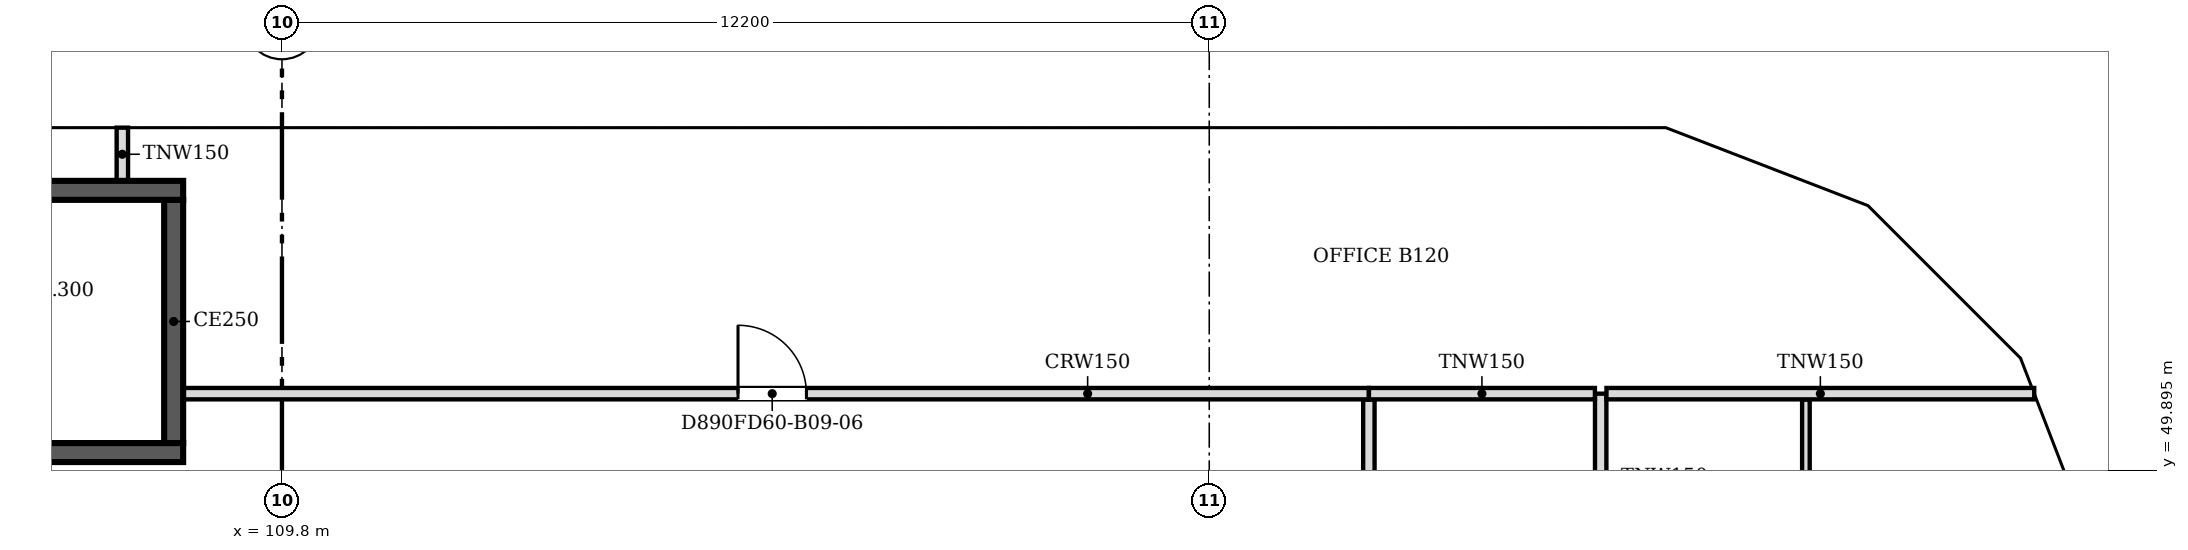
"""IFC4 building model, lengths in metres.
Left out: names, types, materials, properties, quantities, classifications, styles, units other than length and angle.
Written with IfcOpenShell. Run it as: python <this file> out.ifc"""

import sys

from ifc_helpers import new_model, si_unit, direction, frame, frame_2d, origin, place, context, subcontext, project, spatial, polyline, rectangle, outline, extrude, faceted_brep, source, transform, mapped, element, fill, save


model = new_model("IFC4")
c1 = context("Model", 3, precision=1e-05, world=origin(), true_north=direction((0.0, 1.0)))
c2 = subcontext(c1, "Body", "Model", "MODEL_VIEW")
j1 = project(units=[si_unit("LENGTHUNIT", "METRE"), si_unit("PLANEANGLEUNIT", "RADIAN")], contexts=[c1])
p1 = place(None, origin())
s1 = spatial("IfcSite", under=j1, at=p1, CompositionType="ELEMENT")
p2 = place(p1, origin())
s2 = spatial("IfcBuilding", under=s1, at=p2, CompositionType="ELEMENT")
p3 = place(p2, frame((0.0, 0.0, 91.4)))
s3 = spatial("IfcBuildingStorey", under=s2, at=p3, CompositionType="ELEMENT", Elevation=91.4)
m1 = source(origin(), c2, "Body", "Brep", [
    faceted_brep([(2.95, -0.25, 0.0), (3.003, -0.25, 0.068), (3.003, -0.25, 7.531), (2.95, -0.25, 7.6), (0.0, -0.25, 3.8), (0.047, 0.25, 3.86), (2.898, 0.25, 7.532), (2.898, 0.25, 0.068), (0.047, 0.25, 3.74), (2.95, 0.0, 0.0), (2.95, 0.0, 7.6), (0.0, 0.0, 3.8)], [[[0, 1, 2, 3, 4]], [[5, 6, 7, 8]], [[1, 0, 9]], [[10, 3, 2]], [[6, 5, 11, 4, 3, 10]], [[8, 7, 9, 0, 4, 11]], [[8, 11, 5]], [[1, 9, 7, 6, 10, 2]]]),
])
p4 = place(p3, frame((133.95, 48.753, -3.8), z_axis=(0.0, 0.0, 1.0), x_axis=(-0.359855894603, 0.933007896601, 0.0)))
e1 = element("IfcWall", 1, at=p4, inside=s3, PredefinedType="SOLIDWALL", context=c2, shape_type="MappedRepresentation", body=[
    mapped(m1, transform((0.0, 0.0, 0.0), scale=1.0)),
])
m2 = source(origin(), c2, "Body", "SweptSolid", [
    extrude(outline(polyline([(2.75, 6.935), (0.316, 3.8), (2.75, 0.665), (2.75, 6.935)])), frame((0.0, 0.26, 0.0), z_axis=(0.0, -1.0, 0.0), x_axis=(1.0, 0.0, 0.0)), (0.0, 0.0, 1.0), 0.52),
])
p5 = place(p4, origin())
e2 = element("IfcOpeningElement", 2, at=p5, cuts=e1, PredefinedType="OPENING", context=c2, shape_type="MappedRepresentation", body=[
    mapped(m2, transform((0.0, 0.0, 0.0), scale=1.0)),
])
m3 = source(origin(), c2, "Body", "Brep", [
    faceted_brep([(0.053, -0.25, 0.0), (2.997, -0.25, 3.8), (0.053, -0.25, 7.6), (0.0, -0.25, 7.532), (0.0, -0.25, 0.068), (0.106, 0.25, 7.531), (2.944, 0.25, 3.868), (2.944, 0.25, 3.732), (0.106, 0.25, 0.068), (2.997, 0.0, 3.8), (0.053, 0.0, 0.0), (0.053, 0.0, 7.6)], [[[0, 1, 2, 3, 4]], [[5, 6, 7, 8]], [[8, 7, 9, 1, 0, 10]], [[6, 5, 11, 2, 1, 9]], [[3, 2, 11]], [[10, 0, 4]], [[8, 10, 4, 3, 11, 5]], [[9, 7, 6]]]),
])
p6 = place(p3, frame((132.926, 51.469, -3.8), z_axis=(0.0, 0.0, 1.0), x_axis=(-0.707066050402, 0.707147509625, 0.0)))
e3 = element("IfcWall", 3, at=p6, inside=s3, PredefinedType="SOLIDWALL", context=c2, shape_type="MappedRepresentation", body=[
    mapped(m3, transform((0.0, 0.0, 0.0), scale=1.0)),
])
m4 = source(origin(), c2, "Body", "SweptSolid", [
    extrude(outline(polyline([(0.253, 0.666), (2.681, 3.8), (0.253, 6.934), (0.253, 0.666)])), frame((0.0, 0.26, 0.0), z_axis=(0.0, -1.0, 0.0), x_axis=(1.0, 0.0, 0.0)), (0.0, 0.0, 1.0), 0.52),
])
p7 = place(p6, origin())
e4 = element("IfcOpeningElement", 4, at=p7, cuts=e3, PredefinedType="OPENING", context=c2, shape_type="MappedRepresentation", body=[
    mapped(m4, transform((0.0, 0.0, 0.0), scale=1.0)),
])
m5 = source(origin(), c2, "Body", "Brep", [
    faceted_brep([(2.95, -0.25, 0.0), (2.997, -0.25, 0.059), (2.997, -0.25, 7.541), (2.95, -0.25, 7.6), (0.0, -0.25, 3.8), (0.053, 0.25, 3.868), (2.904, 0.25, 7.54), (2.904, 0.25, 0.06), (0.053, 0.25, 3.732), (2.95, 0.0, 0.0), (2.95, 0.0, 7.6), (0.0, 0.0, 3.8)], [[[0, 1, 2, 3, 4]], [[5, 6, 7, 8]], [[1, 0, 9]], [[10, 3, 2]], [[6, 5, 11, 4, 3, 10]], [[8, 7, 9, 0, 4, 11]], [[8, 11, 5]], [[1, 9, 7, 6, 10, 2]]]),
])
p8 = place(p3, frame((130.806, 53.588, -3.8), z_axis=(0.0, 0.0, 1.0), x_axis=(-0.932990326376, 0.359901446078, 0.0)))
e5 = element("IfcWall", 5, at=p8, inside=s3, PredefinedType="SOLIDWALL", context=c2, shape_type="MappedRepresentation", body=[
    mapped(m5, transform((0.0, 0.0, 0.0), scale=1.0)),
])
p9 = place(p8, origin())
e6 = element("IfcOpeningElement", 6, at=p9, cuts=e5, PredefinedType="OPENING", context=c2, shape_type="MappedRepresentation", body=[
    mapped(m2, transform((0.0, 0.0, 0.0), scale=1.0)),
])
m6 = source(origin(), c2, "Body", "Brep", [
    faceted_brep([(0.047, -0.25, 0.0), (3.05, -0.25, 3.8), (0.047, -0.25, 7.6), (0.0, -0.25, 7.54), (0.0, -0.25, 0.06), (0.093, 0.25, 7.541), (3.05, 0.25, 3.8), (0.093, 0.25, 0.059), (0.047, 0.0, 0.0), (0.047, 0.0, 7.6)], [[[0, 1, 2, 3, 4]], [[5, 6, 7]], [[7, 6, 1, 0, 8]], [[6, 5, 9, 2, 1]], [[3, 2, 9]], [[8, 0, 4]], [[7, 8, 4, 3, 9, 5]]]),
])
p10 = place(p3, frame((128.1, 54.65, -3.8), z_axis=(0.0, 0.0, 1.0), x_axis=(-1.0, 0.0, 0.0)))
e7 = element("IfcWall", 7, at=p10, inside=s3, PredefinedType="SOLIDWALL", context=c2, shape_type="MappedRepresentation", body=[
    mapped(m6, transform((0.0, 0.0, 0.0), scale=1.0)),
])
m7 = source(origin(), c2, "Body", "SweptSolid", [
    extrude(outline(polyline([(0.247, 0.656), (2.731, 3.8), (0.247, 6.944), (0.247, 0.656)])), frame((0.0, 0.26, 0.0), z_axis=(0.0, -1.0, 0.0), x_axis=(1.0, 0.0, 0.0)), (0.0, 0.0, 1.0), 0.52),
])
p11 = place(p10, origin())
e8 = element("IfcOpeningElement", 8, at=p11, cuts=e7, PredefinedType="OPENING", context=c2, shape_type="MappedRepresentation", body=[
    mapped(m7, transform((0.0, 0.0, 0.0), scale=1.0)),
])
m8 = source(origin(), c2, "Body", "SweptSolid", [
    extrude(outline(polyline([(3.05, 0.0), (6.1, 3.8), (3.05, 7.6), (0.0, 3.8), (3.05, 0.0)])), frame((0.0, 0.25, 0.0), z_axis=(0.0, -1.0, 0.0), x_axis=(1.0, 0.0, 0.0)), (0.0, 0.0, 1.0), 0.5),
])
p12 = place(p3, frame((125.05, 54.65, -3.8), z_axis=(0.0, 0.0, 1.0), x_axis=(-1.0, 0.0, 0.0)))
e9 = element("IfcWall", 9, at=p12, inside=s3, PredefinedType="SOLIDWALL", context=c2, shape_type="MappedRepresentation", body=[
    mapped(m8, transform((0.0, 0.0, 0.0), scale=1.0)),
])
m9 = source(origin(), c2, "Body", "SweptSolid", [
    extrude(outline(polyline([(3.05, 0.399), (5.78, 3.8), (3.05, 7.2), (0.321, 3.8), (3.05, 0.399)])), frame((0.0, 0.26, 0.0), z_axis=(0.0, -1.0, 0.0), x_axis=(1.0, 0.0, 0.0)), (0.0, 0.0, 1.0), 0.52),
])
p13 = place(p12, origin())
e10 = element("IfcOpeningElement", 10, at=p13, cuts=e9, PredefinedType="OPENING", context=c2, shape_type="MappedRepresentation", body=[
    mapped(m9, transform((0.0, 0.0, 0.0), scale=1.0)),
])
m10 = source(origin(), c2, "Body", "Brep", [
    faceted_brep([(3.05, -0.25, 0.0), (6.1, -0.25, 3.8), (6.1, -0.25, 3.8), (3.05, -0.25, 7.6), (0.0, -0.25, 3.8), (0.0, 0.25, 3.8), (3.05, 0.25, 7.6), (6.1, 0.25, 3.8), (6.1, 0.25, 3.8), (3.05, 0.25, 0.0)], [[[0, 1, 2, 3, 4]], [[5, 6, 7, 8, 9]], [[9, 8, 1, 0]], [[7, 6, 3, 2]], [[6, 5, 4, 3]], [[5, 9, 0, 4]], [[1, 8, 7, 2]]]),
])
p14 = place(p3, frame((118.95, 54.65, -3.8), z_axis=(0.0, 0.0, 1.0), x_axis=(-1.0, 0.0, 0.0)))
e11 = element("IfcWall", 11, at=p14, inside=s3, PredefinedType="SOLIDWALL", context=c2, shape_type="MappedRepresentation", body=[
    mapped(m10, transform((0.0, 0.0, 0.0), scale=1.0)),
])
p15 = place(p14, origin())
e12 = element("IfcOpeningElement", 12, at=p15, cuts=e11, PredefinedType="OPENING", context=c2, shape_type="MappedRepresentation", body=[
    mapped(m9, transform((0.0, 0.0, 0.0), scale=1.0)),
])
p16 = place(p3, frame((112.85, 54.65, -3.8), z_axis=(0.0, 0.0, 1.0), x_axis=(-1.0, 0.0, 0.0)))
e13 = element("IfcWall", 13, at=p16, inside=s3, PredefinedType="SOLIDWALL", context=c2, shape_type="MappedRepresentation", body=[
    mapped(m8, transform((0.0, 0.0, 0.0), scale=1.0)),
])
p17 = place(p16, origin())
e14 = element("IfcOpeningElement", 14, at=p17, cuts=e13, PredefinedType="OPENING", context=c2, shape_type="MappedRepresentation", body=[
    mapped(m9, transform((0.0, 0.0, 0.0), scale=1.0)),
])
m11 = source(origin(), c2, "Body", "Brep", [
    faceted_brep([(0.047, -0.25, 0.0), (2.997, -0.25, 3.8), (0.0, -0.25, 3.8), (0.0, -0.25, 0.059), (0.093, 0.25, 3.8), (2.944, 0.25, 3.8), (2.944, 0.25, 3.732), (0.093, 0.25, 0.06), (2.997, 0.0, 3.8), (0.047, 0.0, 0.0)], [[[0, 1, 2, 3]], [[4, 5, 6, 7]], [[7, 6, 8, 1, 0, 9]], [[5, 4, 2, 1, 8]], [[9, 0, 3]], [[7, 9, 3, 2, 4]], [[6, 5, 8]]]),
])
p18 = place(p3, frame((133.967, 48.71, 0.0), z_axis=(0.0, 0.0, 1.0), x_axis=(-0.359901446078, 0.932990326376, 0.0)))
e15 = element("IfcWall", 15, at=p18, inside=s3, PredefinedType="SOLIDWALL", context=c2, shape_type="MappedRepresentation", body=[
    mapped(m11, transform((0.0, 0.0, 0.0), scale=1.0)),
])
m12 = source(origin(), c2, "Body", "SweptSolid", [
    extrude(outline(polyline([(0.247, 0.665), (2.487, 3.55), (0.247, 3.55), (0.247, 0.665)])), frame((0.0, 0.26, 0.0), z_axis=(0.0, -1.0, 0.0), x_axis=(1.0, 0.0, 0.0)), (0.0, 0.0, 1.0), 0.52),
])
p19 = place(p18, origin())
e16 = element("IfcOpeningElement", 16, at=p19, cuts=e15, PredefinedType="OPENING", context=c2, shape_type="MappedRepresentation", body=[
    mapped(m12, transform((0.0, 0.0, 0.0), scale=1.0)),
])
m13 = source(origin(), c2, "Body", "Brep", [
    faceted_brep([(2.944, -0.25, 0.0), (2.997, -0.25, 0.068), (2.997, -0.25, 3.8), (0.0, -0.25, 3.8), (0.053, 0.25, 3.8), (2.891, 0.25, 3.8), (2.891, 0.25, 0.068), (0.053, 0.25, 3.732), (2.944, 0.0, 0.0), (0.0, 0.0, 3.8)], [[[0, 1, 2, 3]], [[4, 5, 6, 7]], [[1, 0, 8]], [[5, 4, 9, 3, 2]], [[7, 6, 8, 0, 3, 9]], [[7, 9, 4]], [[1, 8, 6, 5, 2]]]),
])
p20 = place(p3, frame((132.888, 51.506, 0.0), z_axis=(0.0, 0.0, 1.0), x_axis=(-0.707147509625, 0.707066050402, 0.0)))
e17 = element("IfcWall", 17, at=p20, inside=s3, PredefinedType="SOLIDWALL", context=c2, shape_type="MappedRepresentation", body=[
    mapped(m13, transform((0.0, 0.0, 0.0), scale=1.0)),
])
m14 = source(origin(), c2, "Body", "SweptSolid", [
    extrude(outline(polyline([(2.744, 3.55), (0.51, 3.55), (2.744, 0.667), (2.744, 3.55)])), frame((0.0, 0.26, 0.0), z_axis=(0.0, -1.0, 0.0), x_axis=(1.0, 0.0, 0.0)), (0.0, 0.0, 1.0), 0.52),
])
p21 = place(p20, origin())
e18 = element("IfcOpeningElement", 18, at=p21, cuts=e17, PredefinedType="OPENING", context=c2, shape_type="MappedRepresentation", body=[
    mapped(m14, transform((0.0, 0.0, 0.0), scale=1.0)),
])
m15 = source(origin(), c2, "Body", "Brep", [
    faceted_brep([(0.053, -0.25, 0.0), (3.003, -0.25, 3.8), (0.0, -0.25, 3.8), (0.0, -0.25, 0.068), (0.106, 0.25, 3.8), (2.957, 0.25, 3.8), (2.957, 0.25, 3.74), (0.106, 0.25, 0.068), (3.003, 0.0, 3.8), (0.053, 0.0, 0.0)], [[[0, 1, 2, 3]], [[4, 5, 6, 7]], [[7, 6, 8, 1, 0, 9]], [[5, 4, 2, 1, 8]], [[9, 0, 3]], [[7, 9, 3, 2, 4]], [[6, 5, 8]]]),
])
p22 = place(p3, frame((130.856, 53.569, 0.0), z_axis=(0.0, 0.0, 1.0), x_axis=(-0.933007896601, 0.359855894603, 0.0)))
e19 = element("IfcWall", 19, at=p22, inside=s3, PredefinedType="SOLIDWALL", context=c2, shape_type="MappedRepresentation", body=[
    mapped(m15, transform((0.0, 0.0, 0.0), scale=1.0)),
])
m16 = source(origin(), c2, "Body", "SweptSolid", [
    extrude(outline(polyline([(0.253, 0.665), (2.493, 3.55), (0.253, 3.55), (0.253, 0.665)])), frame((0.0, 0.26, 0.0), z_axis=(0.0, -1.0, 0.0), x_axis=(1.0, 0.0, 0.0)), (0.0, 0.0, 1.0), 0.52),
])
p23 = place(p22, origin())
e20 = element("IfcOpeningElement", 20, at=p23, cuts=e19, PredefinedType="OPENING", context=c2, shape_type="MappedRepresentation", body=[
    mapped(m16, transform((0.0, 0.0, 0.0), scale=1.0)),
])
m17 = source(origin(), c2, "Body", "Brep", [
    faceted_brep([(3.003, -0.25, 0.0), (6.053, -0.25, 3.8), (0.0, -0.25, 3.8), (0.047, 0.25, 3.8), (6.053, 0.25, 3.8), (3.003, 0.25, 0.0), (0.047, 0.25, 3.741), (0.0, 0.0, 3.8)], [[[0, 1, 2]], [[3, 4, 5, 6]], [[5, 4, 1, 0]], [[4, 3, 7, 2, 1]], [[6, 5, 0, 2, 7]], [[6, 7, 3]]]),
])
p24 = place(p3, frame((128.053, 54.65, 0.0), z_axis=(0.0, 0.0, 1.0), x_axis=(-1.0, 0.0, 0.0)))
e21 = element("IfcWall", 21, at=p24, inside=s3, PredefinedType="SOLIDWALL", context=c2, shape_type="MappedRepresentation", body=[
    mapped(m17, transform((0.0, 0.0, 0.0), scale=1.0)),
])
m18 = source(origin(), c2, "Body", "SweptSolid", [
    extrude(outline(polyline([(3.005, 0.401), (5.532, 3.55), (0.516, 3.55), (3.005, 0.401)])), frame((0.0, 0.26, 0.0), z_axis=(0.0, -1.0, 0.0), x_axis=(1.0, 0.0, 0.0)), (0.0, 0.0, 1.0), 0.52),
])
p25 = place(p24, origin())
e22 = element("IfcOpeningElement", 22, at=p25, cuts=e21, PredefinedType="OPENING", context=c2, shape_type="MappedRepresentation", body=[
    mapped(m18, transform((0.0, 0.0, 0.0), scale=1.0)),
])
m19 = source(origin(), c2, "Body", "SweptSolid", [
    extrude(outline(polyline([(3.05, 0.0), (6.1, 3.8), (0.0, 3.8), (3.05, 0.0)])), frame((0.0, 0.25, 0.0), z_axis=(0.0, -1.0, 0.0), x_axis=(1.0, 0.0, 0.0)), (0.0, 0.0, 1.0), 0.5),
])
p26 = place(p3, frame((122.0, 54.65, 0.0), z_axis=(0.0, 0.0, 1.0), x_axis=(-1.0, 0.0, 0.0)))
e23 = element("IfcWall", 23, at=p26, inside=s3, PredefinedType="SOLIDWALL", context=c2, shape_type="MappedRepresentation", body=[
    mapped(m19, transform((0.0, 0.0, 0.0), scale=1.0)),
])
m20 = source(origin(), c2, "Body", "SweptSolid", [
    extrude(outline(polyline([(3.05, 0.399), (5.579, 3.55), (0.521, 3.55), (3.05, 0.399)])), frame((0.0, 0.26, 0.0), z_axis=(0.0, -1.0, 0.0), x_axis=(1.0, 0.0, 0.0)), (0.0, 0.0, 1.0), 0.52),
])
p27 = place(p26, origin())
e24 = element("IfcOpeningElement", 24, at=p27, cuts=e23, PredefinedType="OPENING", context=c2, shape_type="MappedRepresentation", body=[
    mapped(m20, transform((0.0, 0.0, 0.0), scale=1.0)),
])
m21 = source(origin(), c2, "Body", "Brep", [
    faceted_brep([(3.05, -0.25, 0.0), (6.1, -0.25, 3.8), (6.1, -0.25, 3.8), (0.0, -0.25, 3.8), (0.0, 0.25, 3.8), (6.1, 0.25, 3.8), (6.1, 0.25, 3.8), (3.05, 0.25, 0.0)], [[[0, 1, 2, 3]], [[4, 5, 6, 7]], [[7, 6, 1, 0]], [[5, 4, 3, 2]], [[4, 7, 0, 3]], [[1, 6, 5, 2]]]),
])
p28 = place(p3, frame((115.9, 54.65, 0.0), z_axis=(0.0, 0.0, 1.0), x_axis=(-1.0, 0.0, 0.0)))
e25 = element("IfcWall", 25, at=p28, inside=s3, PredefinedType="SOLIDWALL", context=c2, shape_type="MappedRepresentation", body=[
    mapped(m21, transform((0.0, 0.0, 0.0), scale=1.0)),
])
p29 = place(p28, origin())
e26 = element("IfcOpeningElement", 26, at=p29, cuts=e25, PredefinedType="OPENING", context=c2, shape_type="MappedRepresentation", body=[
    mapped(m20, transform((0.0, 0.0, 0.0), scale=1.0)),
])
p30 = place(p3, frame((109.8, 54.65, 0.0), z_axis=(0.0, 0.0, 1.0), x_axis=(-1.0, 0.0, 0.0)))
e27 = element("IfcWall", 27, at=p30, inside=s3, PredefinedType="SOLIDWALL", context=c2, shape_type="MappedRepresentation", body=[
    mapped(m19, transform((0.0, 0.0, 0.0), scale=1.0)),
])
p31 = place(p30, origin())
e28 = element("IfcOpeningElement", 28, at=p31, cuts=e27, PredefinedType="OPENING", context=c2, shape_type="MappedRepresentation", body=[
    mapped(m20, transform((0.0, 0.0, 0.0), scale=1.0)),
])
p32 = place(p3, frame((108.5, 50.125, 0.0), z_axis=(0.0, 0.0, 1.0), x_axis=(-1.0, 0.0, 0.0)))
e29 = element("IfcWall", 29, at=p32, inside=s3, PredefinedType="SOLIDWALL", context=c2, shape_type="SweptSolid", body=[
    extrude(rectangle(XDim=8.5, YDim=0.25, at=frame_2d((4.25, 0.0))), origin(), (0.0, 0.0, 1.0), 3.8),
])
m22 = source(origin(), c2, "Body", "SweptSolid", [
    extrude(rectangle(XDim=1.1, YDim=2.1, at=frame_2d((0.55, 1.05))), frame((0.0, 0.135, 0.0), z_axis=(0.0, -1.0, 0.0), x_axis=(1.0, 0.0, 0.0)), (0.0, 0.0, 1.0), 0.27),
])
p33 = place(p32, frame((6.95, 0.0, 0.0)))
e30 = element("IfcOpeningElement", 30, at=p33, cuts=e29, PredefinedType="OPENING", context=c2, shape_type="MappedRepresentation", body=[
    mapped(m22, transform((0.0, 0.0, 0.0), scale=1.0)),
])
p34 = place(p3, frame((100.0, 53.575, 0.0), z_axis=(0.0, 0.0, 1.0), x_axis=(1.0, 0.0, 0.0)))
e31 = element("IfcWall", 31, at=p34, inside=s3, PredefinedType="SOLIDWALL", context=c2, shape_type="SweptSolid", body=[
    extrude(rectangle(XDim=8.5, YDim=0.25, at=frame_2d((4.25, 0.0))), origin(), (0.0, 0.0, 1.0), 3.8),
])
p35 = place(p3, frame((108.375, 53.45, 0.0), z_axis=(0.0, 0.0, 1.0), x_axis=(0.0, -1.0, 0.0)))
e32 = element("IfcWall", 32, at=p35, inside=s3, PredefinedType="SOLIDWALL", context=c2, shape_type="SweptSolid", body=[
    extrude(rectangle(XDim=3.2, YDim=0.25, at=frame_2d((1.6, 0.0))), origin(), (0.0, 0.0, 1.0), 3.8),
])
p36 = place(p3, frame((124.1, 50.824, 0.0), z_axis=(0.0, 0.0, 1.0), x_axis=(0.0, -1.0, 0.0)))
e33 = element("IfcWall", 33, at=p36, inside=s3, PredefinedType="PARTITIONING", context=c2, shape_type="SweptSolid", body=[
    extrude(rectangle(XDim=14.224, YDim=0.15, at=frame_2d((7.112, 0.0))), origin(), (0.0, 0.0, 1.0), 2.895),
])
m23 = source(origin(), c2, "Body", "SweptSolid", [
    extrude(rectangle(XDim=1.0, YDim=2.1, at=frame_2d((0.5, 1.05))), frame((0.0, 0.085, 0.0), z_axis=(0.0, -1.0, 0.0), x_axis=(1.0, 0.0, 0.0)), (0.0, 0.0, 1.0), 0.17),
])
p37 = place(p36, frame((2.123, 0.0, 0.0)))
e34 = element("IfcOpeningElement", 34, at=p37, cuts=e33, PredefinedType="OPENING", context=c2, shape_type="MappedRepresentation", body=[
    mapped(m23, transform((0.0, 0.0, 0.0), scale=1.0)),
])
p38 = place(p36, frame((9.224, 0.0, 0.0)))
e35 = element("IfcOpeningElement", 35, at=p38, cuts=e33, PredefinedType="OPENING", context=c2, shape_type="MappedRepresentation", body=[
    mapped(m23, transform((0.0, 0.0, 0.0), scale=1.0)),
])
p39 = place(p3, frame((127.15, 50.9, 0.0), z_axis=(0.0, 0.0, 1.0), x_axis=(0.0, -1.0, 0.0)))
e36 = element("IfcWall", 36, at=p39, inside=s3, PredefinedType="PARTITIONING", context=c2, shape_type="SweptSolid", body=[
    extrude(rectangle(XDim=5.3, YDim=0.15, at=frame_2d((2.65, 0.0))), origin(), (0.0, 0.0, 1.0), 2.895),
])
m24 = source(origin(), c2, "Body", "SweptSolid", [
    extrude(rectangle(XDim=0.9, YDim=2.1, at=frame_2d((0.45, 1.05))), frame((0.0, 0.085, 0.0), z_axis=(0.0, -1.0, 0.0), x_axis=(1.0, 0.0, 0.0)), (0.0, 0.0, 1.0), 0.17),
])
p40 = place(p39, frame((2.2, 0.0, 0.0)))
e37 = element("IfcOpeningElement", 37, at=p40, cuts=e36, PredefinedType="OPENING", context=c2, shape_type="MappedRepresentation", body=[
    mapped(m24, transform((0.0, 0.0, 0.0), scale=1.0)),
])
p41 = place(p3, frame((129.85, 50.824, 0.0), z_axis=(0.0, 0.0, 1.0), x_axis=(0.0, -1.0, 0.0)))
e38 = element("IfcWall", 38, at=p41, inside=s3, PredefinedType="PARTITIONING", context=c2, shape_type="SweptSolid", body=[
    extrude(rectangle(XDim=5.148, YDim=0.1, at=frame_2d((2.574, 0.0))), origin(), (0.0, 0.0, 1.0), 2.895),
])
m25 = source(origin(), c2, "Body", "SweptSolid", [
    extrude(rectangle(XDim=0.9, YDim=2.1, at=frame_2d((0.45, 1.05))), frame((0.0, 0.06, 0.0), z_axis=(0.0, -1.0, 0.0), x_axis=(1.0, 0.0, 0.0)), (0.0, 0.0, 1.0), 0.12),
])
p42 = place(p41, frame((2.148, 0.0, 0.0)))
e39 = element("IfcOpeningElement", 39, at=p42, cuts=e38, PredefinedType="OPENING", context=c2, shape_type="MappedRepresentation", body=[
    mapped(m25, transform((0.0, 0.0, 0.0), scale=1.0)),
])
p43 = place(p3, frame((108.5, 50.9, 0.0), z_axis=(0.0, 0.0, 1.0), x_axis=(1.0, 0.0, 0.0)))
e40 = element("IfcWall", 40, at=p43, inside=s3, PredefinedType="PARTITIONING", context=c2, shape_type="SweptSolid", body=[
    extrude(rectangle(XDim=15.6, YDim=0.15, at=frame_2d((7.8, 0.0))), origin(), (0.0, 0.0, 1.0), 2.895),
])
p44 = place(p43, frame((7.3, 0.0, 0.0)))
e41 = element("IfcOpeningElement", 41, at=p44, cuts=e40, PredefinedType="OPENING", context=c2, shape_type="MappedRepresentation", body=[
    mapped(m24, transform((0.0, 0.0, 0.0), scale=1.0)),
])
p45 = place(p3, frame((124.101, 50.9, 0.0), z_axis=(0.0, 0.0, 1.0), x_axis=(1.0, 0.0, 0.0)))
e42 = element("IfcWall", 42, at=p45, inside=s3, PredefinedType="PARTITIONING", context=c2, shape_type="SweptSolid", body=[
    extrude(rectangle(XDim=2.973, YDim=0.15, at=frame_2d((1.486, 0.0))), origin(), (0.0, 0.0, 1.0), 2.895),
])
p46 = place(p3, frame((127.226, 50.9, 0.0), z_axis=(0.0, 0.0, 1.0), x_axis=(1.0, 0.0, 0.0)))
e43 = element("IfcWall", 43, at=p46, inside=s3, PredefinedType="PARTITIONING", context=c2, shape_type="SweptSolid", body=[
    extrude(rectangle(XDim=5.628, YDim=0.15, at=frame_2d((2.814, 0.0))), origin(), (0.0, 0.0, 1.0), 2.895),
])
p47 = place(p3, frame((107.7, 53.7, 0.0), z_axis=(0.0, 0.0, 1.0), x_axis=(0.0, 1.0, 0.0)))
e44 = element("IfcWall", 44, at=p47, inside=s3, PredefinedType="PARTITIONING", context=c2, shape_type="SweptSolid", body=[
    extrude(rectangle(XDim=0.7, YDim=0.15, at=frame_2d((0.35, 0.0))), origin(), (0.0, 0.0, 1.0), 2.895),
])
m26 = source(origin(), c2, "Body", "SweptSolid", [
    extrude(rectangle(XDim=0.9, YDim=2.1, at=frame_2d((0.45, 1.05))), frame((0.0, 0.025, 0.0), z_axis=(0.0, -1.0, 0.0), x_axis=(1.0, 0.0, 0.0)), (0.0, 0.0, 1.0), 0.05),
])
p48 = place(p44, origin())
e45 = element("IfcDoor", 45, at=p48, inside=s3, OperationType="SINGLE_SWING_LEFT", PredefinedType="DOOR", context=c2, shape_type="MappedRepresentation", body=[
    mapped(m26, transform((0.0, 0.0, 0.0), scale=1.0)),
])
fill(e41, e45)
save(model, sys.argv[1])
